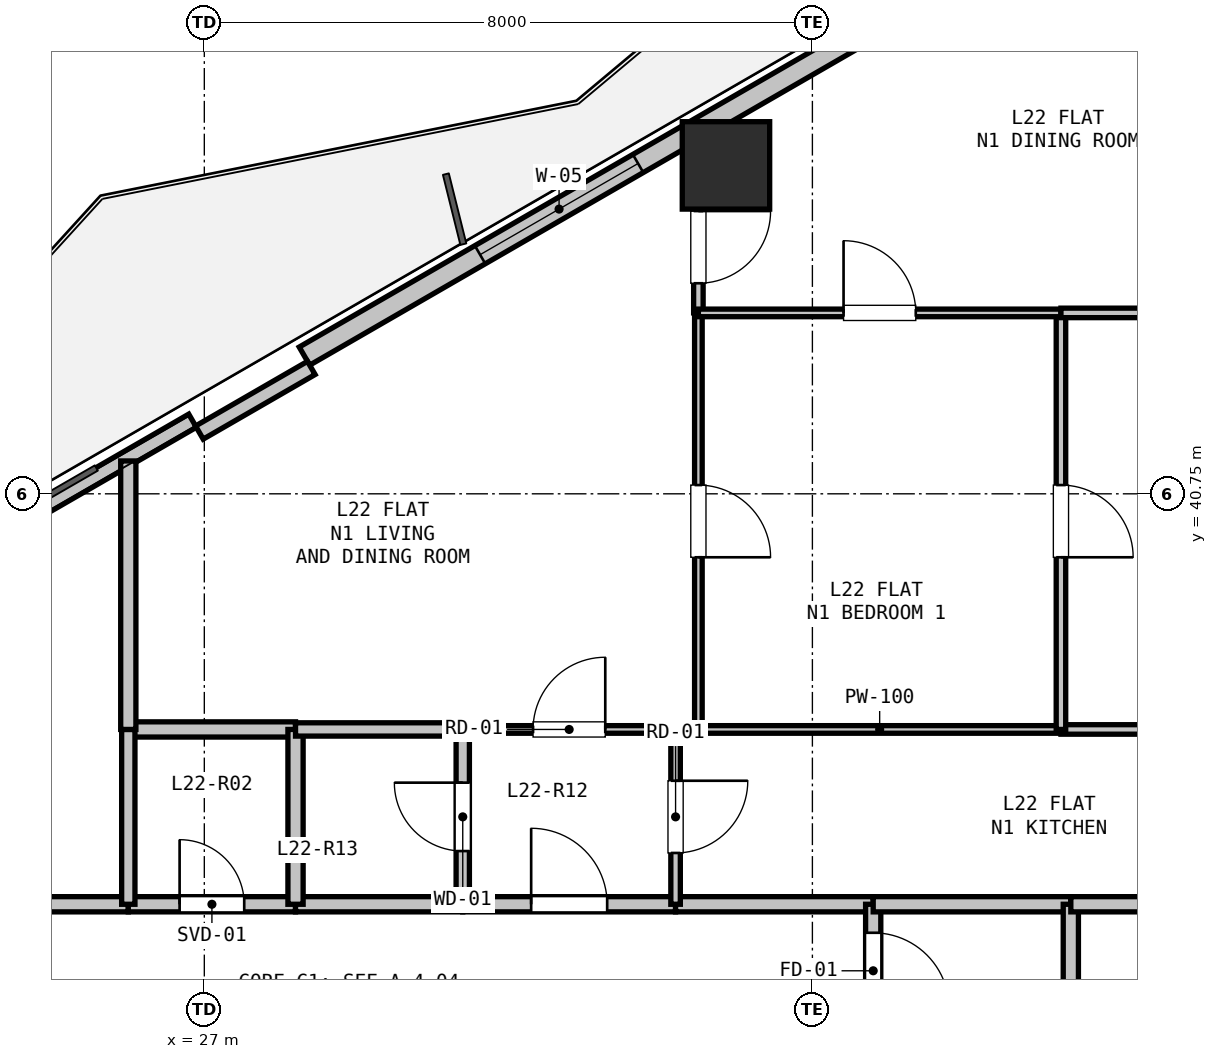
"""IFC4 building model, lengths in metres.
Left out: names, types, materials, properties, quantities, classifications, styles, units other than length and angle.
Written with IfcOpenShell. Run it as: python <this file> out.ifc"""

import sys

from ifc_helpers import new_model, si_unit, direction, frame, frame_2d, origin, origin_2d, place, context, subcontext, project, spatial, rectangle, hollow_rectangle, extrude, element, fill, save


model = new_model("IFC4")
c1 = context("Model", 3, precision=1e-05, world=origin(), true_north=direction((0.0, 1.0)))
c2 = subcontext(c1, "Body", "Model", "MODEL_VIEW")
j1 = project(units=[si_unit("LENGTHUNIT", "METRE"), si_unit("PLANEANGLEUNIT", "RADIAN")], contexts=[c1])
p1 = place(None, origin())
s1 = spatial("IfcSite", under=j1, at=p1, CompositionType="ELEMENT")
p2 = place(p1, origin())
s2 = spatial("IfcBuilding", under=s1, at=p2, CompositionType="ELEMENT")
p3 = place(p2, frame((0.0, 0.0, 83.4)))
s3 = spatial("IfcBuildingStorey", under=s2, at=p3, CompositionType="ELEMENT", Elevation=83.4)
p4 = place(p3, frame((33.863, 45.071, 0.0), z_axis=(0.0, 0.0, 1.0), x_axis=(1.0, 0.0, 0.0)))
e1 = element("IfcColumn", 1, at=p4, inside=s3, PredefinedType="COLUMN", context=c2, shape_type="SweptSolid", body=[
    extrude(hollow_rectangle(XDim=1.15, YDim=1.15, WallThickness=0.032, at=origin_2d()), origin(), (0.0, 0.0, 1.0), 3.3),
])
p5 = place(p3, frame((38.779, 48.602, 0.0), z_axis=(0.0, 0.0, 1.0), x_axis=(0.866011848704, -0.500023477353, 0.0)))
e2 = element("IfcWall", 2, at=p5, inside=s3, PredefinedType="SOLIDWALL", context=c2, shape_type="SweptSolid", body=[
    extrude(rectangle(XDim=4.914, YDim=0.275, at=frame_2d((2.457, 0.0))), origin(), (0.0, 0.0, 1.0), 2.67),
])
p6 = place(p3, frame((17.12, 36.097, 0.0), z_axis=(0.0, 0.0, 1.0), x_axis=(0.866027010039, 0.499997217876, 0.0)))
e3 = element("IfcWall", 3, at=p6, inside=s3, PredefinedType="PARAPET", context=c2, shape_type="SweptSolid", body=[
    extrude(rectangle(XDim=11.229, YDim=0.2, at=frame_2d((5.615, 0.0))), origin(), (0.0, 0.0, 1.0), 0.2),
])
p7 = place(p3, frame((28.317, 42.562, 0.0), z_axis=(0.0, 0.0, 1.0), x_axis=(0.866023023012, 0.500004123596, 0.0)))
e4 = element("IfcWall", 4, at=p7, inside=s3, PredefinedType="SOLIDWALL", context=c2, shape_type="SweptSolid", body=[
    extrude(rectangle(XDim=11.93, YDim=0.275, at=frame_2d((5.965, 0.0))), origin(), (0.0, 0.0, 1.0), 2.67),
])
p8 = place(p7, frame((2.668, 0.0, 0.9)))
e5 = element("IfcOpeningElement", 5, at=p8, cuts=e4, PredefinedType="OPENING", context=c2, shape_type="SweptSolid", body=[
    extrude(rectangle(XDim=2.4, YDim=1.6, at=frame_2d((1.2, 0.8))), frame((0.0, 0.147, 0.0), z_axis=(0.0, -1.0, 0.0), x_axis=(1.0, 0.0, 0.0)), (0.0, 0.0, 1.0), 0.295),
])
p9 = place(p3, frame((26.935, 41.556, 0.0), z_axis=(0.0, 0.0, 1.0), x_axis=(0.86605165483, 0.499954529098, 0.0)))
e6 = element("IfcWall", 6, at=p9, inside=s3, PredefinedType="PARAPET", context=c2, shape_type="SweptSolid", body=[
    extrude(rectangle(XDim=1.7, YDim=0.2, at=frame_2d((0.85, 0.0))), origin(), (0.0, 0.0, 1.0), 2.67),
])
p10 = place(p3, frame((19.6, 35.35, 0.0), z_axis=(0.0, 0.0, 1.0), x_axis=(1.0, 0.0, 0.0)))
e7 = element("IfcWall", 7, at=p10, inside=s3, PredefinedType="PARTITIONING", context=c2, shape_type="SweptSolid", body=[
    extrude(rectangle(XDim=6.4, YDim=0.2, at=frame_2d((3.2, 0.0))), origin(), (0.0, 0.0, 1.0), 3.05),
])
p11 = place(p10, frame((2.966, 0.0, 0.0)))
e8 = element("IfcOpeningElement", 8, at=p11, cuts=e7, PredefinedType="OPENING", context=c2, shape_type="SweptSolid", body=[
    extrude(rectangle(XDim=1.8, YDim=2.2, at=frame_2d((0.9, 1.1))), frame((0.0, 0.11, 0.0), z_axis=(0.0, -1.0, 0.0), x_axis=(1.0, 0.0, 0.0)), (0.0, 0.0, 1.0), 0.22),
])
p12 = place(p3, frame((26.0, 35.35, 0.0), z_axis=(0.0, 0.0, 1.0), x_axis=(1.0, 0.0, 0.0)))
e9 = element("IfcWall", 9, at=p12, inside=s3, PredefinedType="PARTITIONING", context=c2, shape_type="SweptSolid", body=[
    extrude(rectangle(XDim=2.2, YDim=0.2, at=frame_2d((1.1, 0.0))), origin(), (0.0, 0.0, 1.0), 3.05),
])
p13 = place(p12, frame((0.675, 0.0, 0.0)))
e10 = element("IfcOpeningElement", 10, at=p13, cuts=e9, PredefinedType="OPENING", context=c2, shape_type="SweptSolid", body=[
    extrude(rectangle(XDim=0.85, YDim=2.1, at=frame_2d((0.425, 1.05))), frame((0.0, 0.11, 0.0), z_axis=(0.0, -1.0, 0.0), x_axis=(1.0, 0.0, 0.0)), (0.0, 0.0, 1.0), 0.22),
])
p14 = place(p3, frame((28.2, 35.35, 0.0), z_axis=(0.0, 0.0, 1.0), x_axis=(1.0, 0.0, 0.0)))
e11 = element("IfcWall", 11, at=p14, inside=s3, PredefinedType="PARTITIONING", context=c2, shape_type="SweptSolid", body=[
    extrude(rectangle(XDim=2.2, YDim=0.2, at=frame_2d((1.1, 0.0))), origin(), (0.0, 0.0, 1.0), 3.05),
])
p15 = place(p3, frame((30.4, 35.35, 0.0), z_axis=(0.0, 0.0, 1.0), x_axis=(1.0, 0.0, 0.0)))
e12 = element("IfcWall", 12, at=p15, inside=s3, PredefinedType="PARTITIONING", context=c2, shape_type="SweptSolid", body=[
    extrude(rectangle(XDim=2.8, YDim=0.2, at=frame_2d((1.4, 0.0))), origin(), (0.0, 0.0, 1.0), 3.05),
])
p16 = place(p15, frame((0.9, 0.0, 0.0)))
e13 = element("IfcOpeningElement", 13, at=p16, cuts=e12, PredefinedType="OPENING", context=c2, shape_type="SweptSolid", body=[
    extrude(rectangle(XDim=1.0, YDim=2.15, at=frame_2d((0.5, 1.075))), frame((0.0, 0.11, 0.0), z_axis=(0.0, -1.0, 0.0), x_axis=(1.0, 0.0, 0.0)), (0.0, 0.0, 1.0), 0.22),
])
p17 = place(p3, frame((33.2, 35.35, 0.0), z_axis=(0.0, 0.0, 1.0), x_axis=(1.0, 0.0, 0.0)))
e14 = element("IfcWall", 14, at=p17, inside=s3, PredefinedType="PARTITIONING", context=c2, shape_type="SweptSolid", body=[
    extrude(rectangle(XDim=2.6, YDim=0.2, at=frame_2d((1.3, 0.0))), origin(), (0.0, 0.0, 1.0), 3.05),
])
p18 = place(p3, frame((35.8, 35.35, 0.0), z_axis=(0.0, 0.0, 1.0), x_axis=(0.0, -1.0, 0.0)))
e15 = element("IfcWall", 15, at=p18, inside=s3, PredefinedType="PARTITIONING", context=c2, shape_type="SweptSolid", body=[
    extrude(rectangle(XDim=1.75, YDim=0.2, at=frame_2d((0.875, 0.0))), origin(), (0.0, 0.0, 1.0), 3.05),
])
p19 = place(p18, frame((0.375, 0.0, 0.0)))
e16 = element("IfcOpeningElement", 16, at=p19, cuts=e15, PredefinedType="OPENING", context=c2, shape_type="SweptSolid", body=[
    extrude(rectangle(XDim=1.0, YDim=2.15, at=frame_2d((0.5, 1.075))), frame((0.0, 0.11, 0.0), z_axis=(0.0, -1.0, 0.0), x_axis=(1.0, 0.0, 0.0)), (0.0, 0.0, 1.0), 0.22),
])
p20 = place(p3, frame((35.8, 35.35, 0.0), z_axis=(0.0, 0.0, 1.0), x_axis=(1.0, 0.0, 0.0)))
e17 = element("IfcWall", 17, at=p20, inside=s3, PredefinedType="PARTITIONING", context=c2, shape_type="SweptSolid", body=[
    extrude(rectangle(XDim=2.6, YDim=0.2, at=frame_2d((1.3, 0.0))), origin(), (0.0, 0.0, 1.0), 2.423),
])
p21 = place(p3, frame((38.4, 35.35, 0.0), z_axis=(0.0, 0.0, 1.0), x_axis=(0.0, -1.0, 0.0)))
e18 = element("IfcWall", 18, at=p21, inside=s3, PredefinedType="PARTITIONING", context=c2, shape_type="SweptSolid", body=[
    extrude(rectangle(XDim=6.85, YDim=0.2, at=frame_2d((3.425, 0.0))), origin(), (0.0, 0.0, 1.0), 3.05),
])
p22 = place(p21, frame((2.925, 0.0, 0.0)))
e19 = element("IfcOpeningElement", 19, at=p22, cuts=e18, PredefinedType="OPENING", context=c2, shape_type="SweptSolid", body=[
    extrude(rectangle(XDim=1.0, YDim=2.15, at=frame_2d((0.5, 1.075))), frame((0.0, 0.11, 0.0), z_axis=(0.0, -1.0, 0.0), x_axis=(1.0, 0.0, 0.0)), (0.0, 0.0, 1.0), 0.22),
])
p23 = place(p3, frame((30.4, 37.65, 0.0), z_axis=(0.0, 0.0, 1.0), x_axis=(1.0, 0.0, 0.0)))
e20 = element("IfcWall", 20, at=p23, inside=s3, PredefinedType="PARTITIONING", context=c2, shape_type="SweptSolid", body=[
    extrude(rectangle(XDim=2.8, YDim=0.1, at=frame_2d((1.4, 0.0))), origin(), (0.0, 0.0, 1.0), 3.05),
])
p24 = place(p23, frame((0.925, 0.0, 0.0)))
e21 = element("IfcOpeningElement", 21, at=p24, cuts=e20, PredefinedType="OPENING", context=c2, shape_type="SweptSolid", body=[
    extrude(rectangle(XDim=0.95, YDim=2.1, at=frame_2d((0.475, 1.05))), frame((0.0, 0.06, 0.0), z_axis=(0.0, -1.0, 0.0), x_axis=(1.0, 0.0, 0.0)), (0.0, 0.0, 1.0), 0.12),
])
p25 = place(p3, frame((33.2, 37.65, 0.0), z_axis=(0.0, 0.0, 1.0), x_axis=(0.0, -1.0, 0.0)))
e22 = element("IfcWall", 22, at=p25, inside=s3, PredefinedType="PARTITIONING", context=c2, shape_type="SweptSolid", body=[
    extrude(rectangle(XDim=2.3, YDim=0.125, at=frame_2d((1.15, 0.0))), origin(), (0.0, 0.0, 1.0), 3.05),
])
p26 = place(p25, frame((0.675, 0.0, 0.0)))
e23 = element("IfcOpeningElement", 23, at=p26, cuts=e22, PredefinedType="OPENING", context=c2, shape_type="SweptSolid", body=[
    extrude(rectangle(XDim=0.95, YDim=2.1, at=frame_2d((0.475, 1.05))), frame((0.0, 0.073, 0.0), z_axis=(0.0, -1.0, 0.0), x_axis=(1.0, 0.0, 0.0)), (0.0, 0.0, 1.0), 0.145),
])
p27 = place(p3, frame((30.4, 35.35, 0.0), z_axis=(0.0, 0.0, 1.0), x_axis=(0.0, 1.0, 0.0)))
e24 = element("IfcWall", 24, at=p27, inside=s3, PredefinedType="PLUMBINGWALL", context=c2, shape_type="SweptSolid", body=[
    extrude(rectangle(XDim=2.3, YDim=0.175, at=frame_2d((1.15, 0.0))), origin(), (0.0, 0.0, 1.0), 3.05),
])
p28 = place(p27, frame((0.7, 0.0, 0.0)))
e25 = element("IfcOpeningElement", 25, at=p28, cuts=e24, PredefinedType="OPENING", context=c2, shape_type="SweptSolid", body=[
    extrude(rectangle(XDim=0.9, YDim=2.1, at=frame_2d((0.45, 1.05))), frame((0.0, 0.097, 0.0), z_axis=(0.0, -1.0, 0.0), x_axis=(1.0, 0.0, 0.0)), (0.0, 0.0, 1.0), 0.195),
])
p29 = place(p3, frame((26.0, 37.65, 0.0), z_axis=(0.0, 0.0, 1.0), x_axis=(1.0, 0.0, 0.0)))
e26 = element("IfcWall", 26, at=p29, inside=s3, PredefinedType="PARTITIONING", context=c2, shape_type="SweptSolid", body=[
    extrude(rectangle(XDim=2.2, YDim=0.2, at=frame_2d((1.1, 0.0))), origin(), (0.0, 0.0, 1.0), 3.05),
])
p30 = place(p3, frame((28.2, 37.65, 0.0), z_axis=(0.0, 0.0, 1.0), x_axis=(0.0, -1.0, 0.0)))
e27 = element("IfcWall", 27, at=p30, inside=s3, PredefinedType="PARTITIONING", context=c2, shape_type="SweptSolid", body=[
    extrude(rectangle(XDim=2.3, YDim=0.2, at=frame_2d((1.15, 0.0))), origin(), (0.0, 0.0, 1.0), 3.05),
])
p31 = place(p3, frame((26.0, 35.35, 0.0), z_axis=(0.0, 0.0, 1.0), x_axis=(0.0, 1.0, 0.0)))
e28 = element("IfcWall", 28, at=p31, inside=s3, PredefinedType="PLUMBINGWALL", context=c2, shape_type="SweptSolid", body=[
    extrude(rectangle(XDim=2.3, YDim=0.175, at=frame_2d((1.15, 0.0))), origin(), (0.0, 0.0, 1.0), 3.05),
])
p32 = place(p3, frame((28.2, 37.65, 0.0), z_axis=(0.0, 0.0, 1.0), x_axis=(1.0, 0.0, 0.0)))
e29 = element("IfcWall", 29, at=p32, inside=s3, PredefinedType="PLUMBINGWALL", context=c2, shape_type="SweptSolid", body=[
    extrude(rectangle(XDim=2.2, YDim=0.175, at=frame_2d((1.1, 0.0))), origin(), (0.0, 0.0, 1.0), 3.05),
])
p33 = place(p3, frame((42.873, 35.35, 0.0), z_axis=(0.0, 0.0, 1.0), x_axis=(-1.0, 0.0, 0.0)))
e30 = element("IfcWall", 30, at=p33, inside=s3, PredefinedType="PARTITIONING", context=c2, shape_type="SweptSolid", body=[
    extrude(rectangle(XDim=4.473, YDim=0.2, at=frame_2d((2.237, 0.0))), origin(), (0.0, 0.0, 1.0), 2.365),
])
p34 = place(p3, frame((33.2, 37.65, 0.0), z_axis=(0.0, 0.0, 1.0), x_axis=(1.0, 0.0, 0.0)))
e31 = element("IfcWall", 31, at=p34, inside=s3, PredefinedType="PARTITIONING", context=c2, shape_type="SweptSolid", body=[
    extrude(rectangle(XDim=0.3, YDim=0.125, at=frame_2d((0.15, 0.0))), origin(), (0.0, 0.0, 1.0), 3.05),
])
p35 = place(p3, frame((33.5, 37.65, 0.0), z_axis=(0.0, 0.0, 1.0), x_axis=(1.0, 0.0, 0.0)))
e32 = element("IfcWall", 32, at=p35, inside=s3, PredefinedType="PARTITIONING", context=c2, shape_type="SweptSolid", body=[
    extrude(rectangle(XDim=4.77, YDim=0.1, at=frame_2d((2.385, 0.0))), origin(), (0.0, 0.0, 1.0), 2.423),
])
p36 = place(p3, frame((38.27, 37.65, 0.0), z_axis=(0.0, 0.0, 1.0), x_axis=(1.0, 0.0, 0.0)))
e33 = element("IfcWall", 33, at=p36, inside=s3, PredefinedType="PARTITIONING", context=c2, shape_type="SweptSolid", body=[
    extrude(rectangle(XDim=4.603, YDim=0.125, at=frame_2d((2.302, 0.0))), origin(), (0.0, 0.0, 1.0), 2.365),
])
p37 = place(p3, frame((26.0, 41.182, 0.0), z_axis=(0.0, 0.0, 1.0), x_axis=(0.0, -1.0, 0.0)))
e34 = element("IfcWall", 34, at=p37, inside=s3, PredefinedType="PARTITIONING", context=c2, shape_type="SweptSolid", body=[
    extrude(rectangle(XDim=3.532, YDim=0.2, at=frame_2d((1.766, 0.0))), origin(), (0.0, 0.0, 1.0), 2.365),
])
p38 = place(p3, frame((33.5, 45.367, 0.0), z_axis=(0.0, 0.0, 1.0), x_axis=(0.0, -1.0, 0.0)))
e35 = element("IfcWall", 35, at=p38, inside=s3, PredefinedType="PARTITIONING", context=c2, shape_type="SweptSolid", body=[
    extrude(rectangle(XDim=2.237, YDim=0.125, at=frame_2d((1.119, 0.0))), origin(), (0.0, 0.0, 1.0), 2.66),
])
p39 = place(p38, frame((0.897, 0.0, 0.0)))
e36 = element("IfcOpeningElement", 36, at=p39, cuts=e35, PredefinedType="OPENING", context=c2, shape_type="SweptSolid", body=[
    extrude(rectangle(XDim=0.95, YDim=2.1, at=frame_2d((0.475, 1.05))), frame((0.0, 0.073, 0.0), z_axis=(0.0, -1.0, 0.0), x_axis=(1.0, 0.0, 0.0)), (0.0, 0.0, 1.0), 0.145),
])
p40 = place(p3, frame((33.5, 43.13, 0.0), z_axis=(0.0, 0.0, 1.0), x_axis=(0.0, -1.0, 0.0)))
e37 = element("IfcWall", 37, at=p40, inside=s3, PredefinedType="PARTITIONING", context=c2, shape_type="SweptSolid", body=[
    extrude(rectangle(XDim=5.48, YDim=0.1, at=frame_2d((2.74, 0.0))), origin(), (0.0, 0.0, 1.0), 3.05),
])
p41 = place(p40, frame((2.265, 0.0, 0.0)))
e38 = element("IfcOpeningElement", 38, at=p41, cuts=e37, PredefinedType="OPENING", context=c2, shape_type="SweptSolid", body=[
    extrude(rectangle(XDim=0.95, YDim=2.1, at=frame_2d((0.475, 1.05))), frame((0.0, 0.06, 0.0), z_axis=(0.0, -1.0, 0.0), x_axis=(1.0, 0.0, 0.0)), (0.0, 0.0, 1.0), 0.12),
])
p42 = place(p3, frame((38.27, 43.13, 0.0), z_axis=(0.0, 0.0, 1.0), x_axis=(0.0, -1.0, 0.0)))
e39 = element("IfcWall", 39, at=p42, inside=s3, PredefinedType="PARTITIONING", context=c2, shape_type="SweptSolid", body=[
    extrude(rectangle(XDim=5.48, YDim=0.125, at=frame_2d((2.74, 0.0))), origin(), (0.0, 0.0, 1.0), 3.05),
])
p43 = place(p42, frame((2.265, 0.0, 0.0)))
e40 = element("IfcOpeningElement", 40, at=p43, cuts=e39, PredefinedType="OPENING", context=c2, shape_type="SweptSolid", body=[
    extrude(rectangle(XDim=0.95, YDim=2.1, at=frame_2d((0.475, 1.05))), frame((0.0, 0.073, 0.0), z_axis=(0.0, -1.0, 0.0), x_axis=(1.0, 0.0, 0.0)), (0.0, 0.0, 1.0), 0.145),
])
p44 = place(p3, frame((33.5, 43.13, 0.0), z_axis=(0.0, 0.0, 1.0), x_axis=(1.0, 0.0, 0.0)))
e41 = element("IfcWall", 41, at=p44, inside=s3, PredefinedType="PARTITIONING", context=c2, shape_type="SweptSolid", body=[
    extrude(rectangle(XDim=4.77, YDim=0.1, at=frame_2d((2.385, 0.0))), origin(), (0.0, 0.0, 1.0), 2.423),
])
p45 = place(p44, frame((1.91, 0.0, 0.0)))
e42 = element("IfcOpeningElement", 42, at=p45, cuts=e41, PredefinedType="OPENING", context=c2, shape_type="SweptSolid", body=[
    extrude(rectangle(XDim=0.95, YDim=2.1, at=frame_2d((0.475, 1.05))), frame((0.0, 0.06, 0.0), z_axis=(0.0, -1.0, 0.0), x_axis=(1.0, 0.0, 0.0)), (0.0, 0.0, 1.0), 0.12),
])
p46 = place(p3, frame((38.27, 43.13, 0.0), z_axis=(0.0, 0.0, 1.0), x_axis=(1.0, 0.0, 0.0)))
e43 = element("IfcWall", 43, at=p46, inside=s3, PredefinedType="PARTITIONING", context=c2, shape_type="SweptSolid", body=[
    extrude(rectangle(XDim=4.603, YDim=0.125, at=frame_2d((2.302, 0.0))), origin(), (0.0, 0.0, 1.0), 2.66),
])
p47 = place(p46, frame((1.826, 0.0, 0.0)))
e44 = element("IfcOpeningElement", 44, at=p47, cuts=e43, PredefinedType="OPENING", context=c2, shape_type="SweptSolid", body=[
    extrude(rectangle(XDim=0.95, YDim=2.1, at=frame_2d((0.475, 1.05))), frame((0.0, 0.073, 0.0), z_axis=(0.0, -1.0, 0.0), x_axis=(1.0, 0.0, 0.0)), (0.0, 0.0, 1.0), 0.145),
])
p48 = place(p8, origin())
e45 = element("IfcWindow", 45, at=p48, inside=s3, PartitioningType="SINGLE_PANEL", PredefinedType="WINDOW", context=c2, shape_type="SweptSolid", body=[
    extrude(rectangle(XDim=2.4, YDim=1.6, at=frame_2d((1.2, 0.8))), frame((0.0, 0.03, 0.0), z_axis=(0.0, -1.0, 0.0), x_axis=(1.0, 0.0, 0.0)), (0.0, 0.0, 1.0), 0.06),
])
fill(e5, e45)
p49 = place(p19, origin())
e46 = element("IfcDoor", 46, at=p49, inside=s3, OperationType="SINGLE_SWING_RIGHT", PredefinedType="DOOR", context=c2, shape_type="SweptSolid", body=[
    extrude(rectangle(XDim=1.0, YDim=2.15, at=frame_2d((0.5, 1.075))), frame((0.0, 0.025, 0.0), z_axis=(0.0, -1.0, 0.0), x_axis=(1.0, 0.0, 0.0)), (0.0, 0.0, 1.0), 0.05),
])
fill(e16, e46)
p50 = place(p16, origin())
e47 = element("IfcDoor", 47, at=p50, inside=s3, OperationType="SINGLE_SWING_LEFT", PredefinedType="DOOR", context=c2, shape_type="SweptSolid", body=[
    extrude(rectangle(XDim=1.0, YDim=2.15, at=frame_2d((0.5, 1.075))), frame((0.0, 0.025, 0.0), z_axis=(0.0, -1.0, 0.0), x_axis=(1.0, 0.0, 0.0)), (0.0, 0.0, 1.0), 0.05),
])
fill(e13, e47)
p51 = place(p13, origin())
e48 = element("IfcDoor", 48, at=p51, inside=s3, OperationType="SINGLE_SWING_LEFT", PredefinedType="DOOR", context=c2, shape_type="SweptSolid", body=[
    extrude(rectangle(XDim=0.85, YDim=2.1, at=frame_2d((0.425, 1.05))), frame((0.0, 0.025, 0.0), z_axis=(0.0, -1.0, 0.0), x_axis=(1.0, 0.0, 0.0)), (0.0, 0.0, 1.0), 0.05),
])
fill(e10, e48)
p52 = place(p28, origin())
e49 = element("IfcDoor", 49, at=p52, inside=s3, OperationType="SINGLE_SWING_RIGHT", PredefinedType="DOOR", context=c2, shape_type="SweptSolid", body=[
    extrude(rectangle(XDim=0.9, YDim=2.1, at=frame_2d((0.45, 1.05))), frame((0.0, 0.025, 0.0), z_axis=(0.0, -1.0, 0.0), x_axis=(1.0, 0.0, 0.0)), (0.0, 0.0, 1.0), 0.05),
])
fill(e25, e49)
p53 = place(p26, origin())
e50 = element("IfcDoor", 50, at=p53, inside=s3, OperationType="SINGLE_SWING_LEFT", PredefinedType="DOOR", context=c2, shape_type="SweptSolid", body=[
    extrude(rectangle(XDim=0.95, YDim=2.1, at=frame_2d((0.475, 1.05))), frame((0.0, 0.025, 0.0), z_axis=(0.0, -1.0, 0.0), x_axis=(1.0, 0.0, 0.0)), (0.0, 0.0, 1.0), 0.05),
])
fill(e23, e50)
p54 = place(p24, origin())
e51 = element("IfcDoor", 51, at=p54, inside=s3, OperationType="SINGLE_SWING_RIGHT", PredefinedType="DOOR", context=c2, shape_type="SweptSolid", body=[
    extrude(rectangle(XDim=0.95, YDim=2.1, at=frame_2d((0.475, 1.05))), frame((0.0, 0.025, 0.0), z_axis=(0.0, -1.0, 0.0), x_axis=(1.0, 0.0, 0.0)), (0.0, 0.0, 1.0), 0.05),
])
fill(e21, e51)
p55 = place(p41, origin())
e52 = element("IfcDoor", 52, at=p55, inside=s3, OperationType="SINGLE_SWING_RIGHT", PredefinedType="DOOR", context=c2, shape_type="SweptSolid", body=[
    extrude(rectangle(XDim=0.95, YDim=2.1, at=frame_2d((0.475, 1.05))), frame((0.0, 0.025, 0.0), z_axis=(0.0, -1.0, 0.0), x_axis=(1.0, 0.0, 0.0)), (0.0, 0.0, 1.0), 0.05),
])
fill(e38, e52)
p56 = place(p39, origin())
e53 = element("IfcDoor", 53, at=p56, inside=s3, OperationType="SINGLE_SWING_LEFT", PredefinedType="DOOR", context=c2, shape_type="SweptSolid", body=[
    extrude(rectangle(XDim=0.95, YDim=2.1, at=frame_2d((0.475, 1.05))), frame((0.0, 0.025, 0.0), z_axis=(0.0, -1.0, 0.0), x_axis=(1.0, 0.0, 0.0)), (0.0, 0.0, 1.0), 0.05),
])
fill(e36, e53)
p57 = place(p43, origin())
e54 = element("IfcDoor", 54, at=p57, inside=s3, OperationType="SINGLE_SWING_RIGHT", PredefinedType="DOOR", context=c2, shape_type="SweptSolid", body=[
    extrude(rectangle(XDim=0.95, YDim=2.1, at=frame_2d((0.475, 1.05))), frame((0.0, 0.025, 0.0), z_axis=(0.0, -1.0, 0.0), x_axis=(1.0, 0.0, 0.0)), (0.0, 0.0, 1.0), 0.05),
])
fill(e40, e54)
p58 = place(p45, origin())
e55 = element("IfcDoor", 55, at=p58, inside=s3, OperationType="SINGLE_SWING_LEFT", PredefinedType="DOOR", context=c2, shape_type="SweptSolid", body=[
    extrude(rectangle(XDim=0.95, YDim=2.1, at=frame_2d((0.475, 1.05))), frame((0.0, 0.025, 0.0), z_axis=(0.0, -1.0, 0.0), x_axis=(1.0, 0.0, 0.0)), (0.0, 0.0, 1.0), 0.05),
])
fill(e42, e55)
save(model, sys.argv[1])
